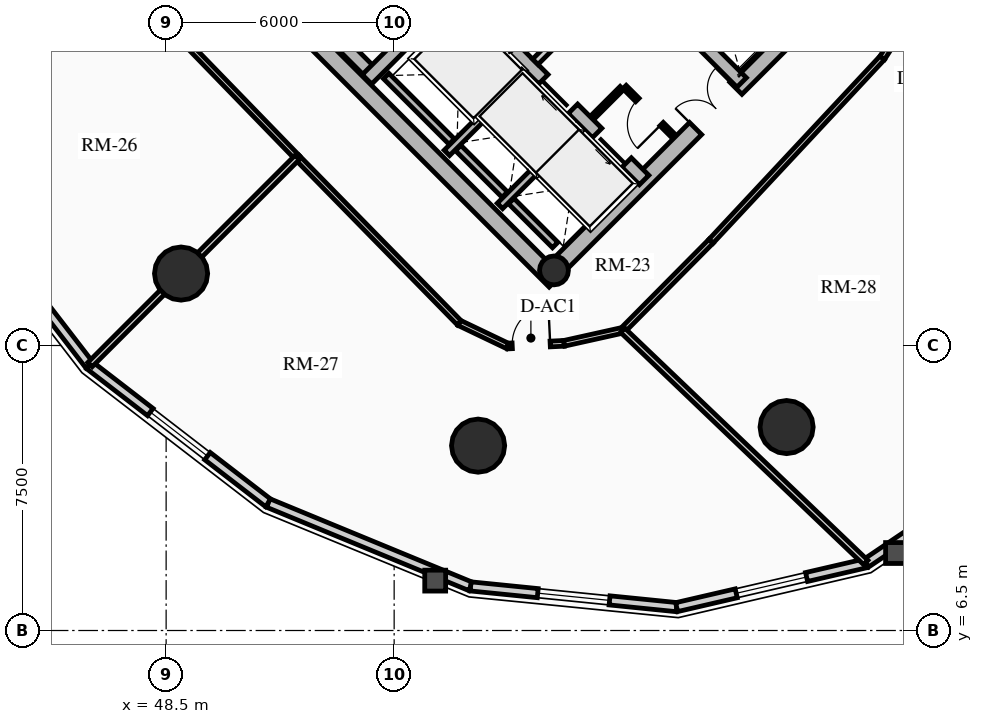
"""IFC4 building model, lengths in metres.
Left out: names, types, materials, properties, quantities, classifications, styles, units other than length and angle.
Written with IfcOpenShell. Run it as: python <this file> out.ifc"""

import sys

from ifc_helpers import new_model, si_unit, direction, frame, frame_2d, origin, origin_2d, place, context, subcontext, project, spatial, rectangle, circle, hollow_circle, extrude, source, transform, mapped, element, fill, save


model = new_model("IFC4")
c1 = context("Model", 3, precision=1e-05, world=origin(), true_north=direction((0.0, 1.0)))
c2 = subcontext(c1, "Body", "Model", "MODEL_VIEW")
j1 = project(units=[si_unit("LENGTHUNIT", "METRE"), si_unit("PLANEANGLEUNIT", "RADIAN")], contexts=[c1])
p1 = place(None, origin())
s1 = spatial("IfcSite", under=j1, at=p1, CompositionType="ELEMENT")
p2 = place(p1, origin())
s2 = spatial("IfcBuilding", under=s1, at=p2, CompositionType="ELEMENT")
p3 = place(p2, frame((0.0, 0.0, 136.6)))
s3 = spatial("IfcBuildingStorey", under=s2, at=p3, CompositionType="ELEMENT", Elevation=136.6)
p4 = place(p3, frame((58.737, 15.697, 0.0), z_axis=(0.0, 0.0, 1.0), x_axis=(-0.707106781187, 0.707106781187, 0.0)))
e1 = element("IfcWall", 1, at=p4, inside=s3, PredefinedType="SHEAR", context=c2, shape_type="SweptSolid", body=[
    extrude(rectangle(XDim=14.2, YDim=0.45, at=frame_2d((7.1, 0.0))), origin(), (0.0, 0.0, 1.0), 3.72),
])
p5 = place(p3, frame((58.578, 15.856, 0.0), z_axis=(0.0, 0.0, 1.0), x_axis=(0.707106781187, 0.707106781187, 0.0)))
e2 = element("IfcWall", 2, at=p5, inside=s3, PredefinedType="SHEAR", context=c2, shape_type="SweptSolid", body=[
    extrude(rectangle(XDim=10.7, YDim=0.45, at=frame_2d((5.35, 0.0))), origin(), (0.0, 0.0, 1.0), 3.72),
])
m1 = source(origin(), c2, "Body", "SweptSolid", [
    extrude(rectangle(XDim=1.5, YDim=2.02, at=frame_2d((0.75, 1.01))), frame((0.0, 0.235, 0.0), z_axis=(0.0, -1.0, 0.0), x_axis=(1.0, 0.0, 0.0)), (0.0, 0.0, 1.0), 0.47),
])
p6 = place(p5, frame((5.45, 0.0, 0.0)))
e3 = element("IfcOpeningElement", 3, at=p6, cuts=e2, PredefinedType="OPENING", context=c2, shape_type="MappedRepresentation", body=[
    mapped(m1, transform((0.0, 0.0, 0.0), x_axis=(1.0, 0.0, 0.0), y_axis=(0.0, 1.0, 0.0), z_axis=(0.0, 0.0, 1.0), scale=1.0)),
])
p7 = place(p3, frame((61.078, 18.355, 0.0), z_axis=(0.0, 0.0, 1.0), x_axis=(-0.707106781187, 0.707106781187, 0.0)))
e4 = element("IfcWall", 4, at=p7, inside=s3, PredefinedType="SHEAR", context=c2, shape_type="SweptSolid", body=[
    extrude(rectangle(XDim=13.75, YDim=0.35, at=frame_2d((6.875, 0.0))), origin(), (0.0, 0.0, 1.0), 3.72),
])
m2 = source(origin(), c2, "Body", "SweptSolid", [
    extrude(rectangle(XDim=1.1, YDim=2.015, at=frame_2d((0.55, 1.007))), frame((0.0, 0.185, 0.0), z_axis=(0.0, -1.0, 0.0), x_axis=(1.0, 0.0, 0.0)), (0.0, 0.0, 1.0), 0.37),
])
p8 = place(p7, frame((4.875, 0.0, 0.0)))
e5 = element("IfcOpeningElement", 5, at=p8, cuts=e4, PredefinedType="OPENING", context=c2, shape_type="MappedRepresentation", body=[
    mapped(m2, transform((0.0, 0.0, 0.0), x_axis=(1.0, 0.0, 0.0), y_axis=(0.0, 1.0, 0.0), z_axis=(0.0, 0.0, 1.0), scale=1.0)),
])
p9 = place(p7, frame((0.65, 0.0, 0.0)))
e6 = element("IfcOpeningElement", 6, at=p9, cuts=e4, PredefinedType="OPENING", context=c2, shape_type="MappedRepresentation", body=[
    mapped(m2, transform((0.0, 0.0, 0.0), x_axis=(1.0, 0.0, 0.0), y_axis=(0.0, 1.0, 0.0), z_axis=(0.0, 0.0, 1.0), scale=1.0)),
])
p10 = place(p7, frame((2.65, 0.0, 0.0)))
e7 = element("IfcOpeningElement", 7, at=p10, cuts=e4, PredefinedType="OPENING", context=c2, shape_type="MappedRepresentation", body=[
    mapped(m2, transform((0.0, 0.0, 0.0), x_axis=(1.0, 0.0, 0.0), y_axis=(0.0, 1.0, 0.0), z_axis=(0.0, 0.0, 1.0), scale=1.0)),
])
m3 = source(origin(), c2, "Body", "SweptSolid", [
    extrude(rectangle(XDim=1.15, YDim=2.02, at=frame_2d((0.575, 1.01))), frame((0.0, 0.185, 0.0), z_axis=(0.0, -1.0, 0.0), x_axis=(1.0, 0.0, 0.0)), (0.0, 0.0, 1.0), 0.37),
])
p11 = place(p7, frame((7.295, 0.0, 0.0)))
e8 = element("IfcOpeningElement", 8, at=p11, cuts=e4, PredefinedType="OPENING", context=c2, shape_type="MappedRepresentation", body=[
    mapped(m3, transform((0.0, 0.0, 0.0), x_axis=(1.0, 0.0, 0.0), y_axis=(0.0, 1.0, 0.0), z_axis=(0.0, 0.0, 1.0), scale=1.0)),
])
p12 = place(p3, frame((63.645, 20.922, 0.0), z_axis=(0.0, 0.0, 1.0), x_axis=(-0.70711946392, 0.707094098226, 0.0)))
e9 = element("IfcWall", 9, at=p12, inside=s3, PredefinedType="SHEAR", context=c2, shape_type="SweptSolid", body=[
    extrude(rectangle(XDim=9.625, YDim=0.35, at=frame_2d((4.812, 0.0))), origin(), (0.0, 0.0, 1.0), 3.72),
])
p13 = place(p12, frame((5.305, 0.0, 0.0)))
e10 = element("IfcOpeningElement", 10, at=p13, cuts=e9, PredefinedType="OPENING", context=c2, shape_type="MappedRepresentation", body=[
    mapped(m3, transform((0.0, 0.0, 0.0), x_axis=(1.0, 0.0, 0.0), y_axis=(0.0, 1.0, 0.0), z_axis=(0.0, 0.0, 1.0), scale=1.0)),
])
p14 = place(p3, frame((53.922, 21.141, 0.0), z_axis=(0.0, 0.0, 1.0), x_axis=(-0.707088616009, 0.707124945897, 0.0)))
e11 = element("IfcWall", 11, at=p14, inside=s3, PredefinedType="SHEAR", context=c2, shape_type="SweptSolid", body=[
    extrude(rectangle(XDim=6.72, YDim=0.35, at=frame_2d((3.36, 0.0))), origin(), (0.0, 0.0, 1.0), 3.72),
])
p15 = place(p3, frame((53.784, 21.003, 0.0), z_axis=(0.0, 0.0, 1.0), x_axis=(0.707106781187, 0.707106781187, 0.0)))
e12 = element("IfcWall", 12, at=p15, inside=s3, PredefinedType="SHEAR", context=c2, shape_type="SweptSolid", body=[
    extrude(rectangle(XDim=3.285, YDim=0.35, at=frame_2d((1.643, 0.0))), origin(), (0.0, 0.0, 1.0), 3.72),
])
p16 = place(p3, frame((58.706, 15.976, 0.0), z_axis=(0.0, 0.0, 1.0), x_axis=(0.707106781187, 0.707106781187, 0.0)))
e13 = element("IfcColumn", 13, at=p16, inside=s3, PredefinedType="COLUMN", context=c2, shape_type="SweptSolid", body=[
    extrude(hollow_circle(Radius=0.38, WallThickness=0.032, at=origin_2d()), origin(), (0.0, 0.0, 1.0), 3.72),
])
for number, where, z_axis, x_axis in (
    (14, (48.893, 15.893, 0.0), (0.0, 0.0, 1.0), (1.0, 0.0, 0.0)),
    (15, (56.709, 11.365, 0.0), (0.0, 0.0, 1.0), (1.0, 0.0, 0.0)),
    (16, (64.827, 11.854, 0.0), (0.0, 0.0, 1.0), (1.0, 0.0, 0.0)),
):
    element("IfcColumn", number, at=place(p3, frame(where, z_axis=z_axis, x_axis=x_axis)), inside=s3, PredefinedType="USERDEFINED", context=c2, shape_type="SweptSolid", body=[
        extrude(circle(Radius=0.7, at=origin_2d()), origin(), (0.0, 0.0, 1.0), 3.72),
    ])
p17 = place(p3, frame((46.483, 13.483, 0.0), z_axis=(0.0, 0.0, 1.0), x_axis=(-0.61054437102, 0.791982052206, 0.0)))
e17 = element("IfcWall", 17, at=p17, inside=s3, PredefinedType="SOLIDWALL", context=c2, shape_type="SweptSolid", body=[
    extrude(rectangle(XDim=5.942, YDim=0.24, at=frame_2d((2.971, 0.0))), origin(), (0.0, 0.0, 1.0), 2.949),
])
p18 = place(p3, frame((51.189, 9.855, 0.0), z_axis=(0.0, 0.0, 1.0), x_axis=(-0.791982052206, 0.61054437102, 0.0)))
e18 = element("IfcWall", 18, at=p18, inside=s3, PredefinedType="SOLIDWALL", context=c2, shape_type="SweptSolid", body=[
    extrude(rectangle(XDim=5.942, YDim=0.24, at=frame_2d((2.971, 0.0))), origin(), (0.0, 0.0, 1.0), 2.949),
])
m4 = source(origin(), c2, "Body", "SweptSolid", [
    extrude(rectangle(XDim=1.9, YDim=1.35, at=frame_2d((0.95, 0.675))), frame((0.0, 0.13, 0.0), z_axis=(0.0, -1.0, 0.0), x_axis=(1.0, 0.0, 0.0)), (0.0, 0.0, 1.0), 0.26),
])
p19 = place(p18, frame((2.021, 0.0, 0.65)))
e19 = element("IfcOpeningElement", 19, at=p19, cuts=e18, PredefinedType="OPENING", context=c2, shape_type="MappedRepresentation", body=[
    mapped(m4, transform((0.0, 0.0, 0.0), x_axis=(1.0, 0.0, 0.0), y_axis=(0.0, 1.0, 0.0), z_axis=(0.0, 0.0, 1.0), scale=1.0)),
])
p20 = place(p3, frame((56.513, 7.661, 0.0), z_axis=(0.0, 0.0, 1.0), x_axis=(-0.924563909604, 0.381027003055, 0.0)))
e20 = element("IfcWall", 20, at=p20, inside=s3, PredefinedType="SOLIDWALL", context=c2, shape_type="SweptSolid", body=[
    extrude(rectangle(XDim=5.758, YDim=0.24, at=frame_2d((2.879, 0.0))), origin(), (0.0, 0.0, 1.0), 2.949),
])
p21 = place(p3, frame((61.933, 7.115, 0.0), z_axis=(0.0, 0.0, 1.0), x_axis=(-0.994971754311, 0.10015591906, 0.0)))
e21 = element("IfcWall", 21, at=p21, inside=s3, PredefinedType="SOLIDWALL", context=c2, shape_type="SweptSolid", body=[
    extrude(rectangle(XDim=5.448, YDim=0.24, at=frame_2d((2.724, 0.0))), origin(), (0.0, 0.0, 1.0), 2.949),
])
p22 = place(p21, frame((1.774, 0.0, 0.65)))
e22 = element("IfcOpeningElement", 22, at=p22, cuts=e21, PredefinedType="OPENING", context=c2, shape_type="MappedRepresentation", body=[
    mapped(m4, transform((0.0, 0.0, 0.0), x_axis=(1.0, 0.0, 0.0), y_axis=(0.0, 1.0, 0.0), z_axis=(0.0, 0.0, 1.0), scale=1.0)),
])
p23 = place(p3, frame((66.92, 8.271, 0.0), z_axis=(0.0, 0.0, 1.0), x_axis=(-0.974165631126, -0.225834725257, 0.0)))
e23 = element("IfcWall", 23, at=p23, inside=s3, PredefinedType="SOLIDWALL", context=c2, shape_type="SweptSolid", body=[
    extrude(rectangle(XDim=5.119, YDim=0.24, at=frame_2d((2.56, 0.0))), origin(), (0.0, 0.0, 1.0), 2.949),
])
p24 = place(p23, frame((1.609, 0.0, 0.65)))
e24 = element("IfcOpeningElement", 24, at=p24, cuts=e23, PredefinedType="OPENING", context=c2, shape_type="MappedRepresentation", body=[
    mapped(m4, transform((0.0, 0.0, 0.0), x_axis=(1.0, 0.0, 0.0), y_axis=(0.0, 1.0, 0.0), z_axis=(0.0, 0.0, 1.0), scale=1.0)),
])
p25 = place(p3, frame((70.985, 11.015, 0.0), z_axis=(0.0, 0.0, 1.0), x_axis=(-0.828781148131, -0.559572880421, 0.0)))
e25 = element("IfcWall", 25, at=p25, inside=s3, PredefinedType="SOLIDWALL", context=c2, shape_type="SweptSolid", body=[
    extrude(rectangle(XDim=4.905, YDim=0.24, at=frame_2d((2.452, 0.0))), origin(), (0.0, 0.0, 1.0), 2.949),
])
p26 = place(p3, frame((55.888, 19.069, 0.0), z_axis=(0.0, 0.0, 1.0), x_axis=(0.707106781187, 0.707106781187, 0.0)))
e26 = element("IfcWall", 26, at=p26, inside=s3, PredefinedType="SHEAR", context=c2, shape_type="SweptSolid", body=[
    extrude(rectangle(XDim=2.97, YDim=0.2, at=frame_2d((1.485, 0.0))), origin(), (0.0, 0.0, 1.0), 3.72),
])
p27 = place(p3, frame((56.015, 19.366, 0.0), z_axis=(0.0, 0.0, 1.0), x_axis=(-0.707106781187, 0.707106781187, 0.0)))
e27 = element("IfcWall", 27, at=p27, inside=s3, PredefinedType="SHEAR", context=c2, shape_type="SweptSolid", body=[
    extrude(rectangle(XDim=2.44, YDim=0.2, at=frame_2d((1.22, 0.0))), origin(), (0.0, 0.0, 1.0), 3.72),
])
p28 = place(p3, frame((57.284, 17.673, 0.0), z_axis=(0.0, 0.0, 1.0), x_axis=(0.707147878904, 0.70706568108, 0.0)))
e28 = element("IfcWall", 28, at=p28, inside=s3, PredefinedType="SHEAR", context=c2, shape_type="SweptSolid", body=[
    extrude(rectangle(XDim=2.97, YDim=0.2, at=frame_2d((1.485, 0.0))), origin(), (0.0, 0.0, 1.0), 3.72),
])
p29 = place(p3, frame((57.412, 17.97, 0.0), z_axis=(0.0, 0.0, 1.0), x_axis=(-0.707106781187, 0.707106781187, 0.0)))
e29 = element("IfcWall", 29, at=p29, inside=s3, PredefinedType="SHEAR", context=c2, shape_type="SweptSolid", body=[
    extrude(rectangle(XDim=1.735, YDim=0.2, at=frame_2d((0.867, 0.0))), origin(), (0.0, 0.0, 1.0), 3.72),
])
p30 = place(p3, frame((58.737, 16.644, 0.0), z_axis=(0.0, 0.0, 1.0), x_axis=(-0.707032117043, 0.707181437447, 0.0)))
e30 = element("IfcWall", 30, at=p30, inside=s3, PredefinedType="SHEAR", context=c2, shape_type="SweptSolid", body=[
    extrude(rectangle(XDim=1.635, YDim=0.2, at=frame_2d((0.817, 0.0))), origin(), (0.0, 0.0, 1.0), 3.72),
])
p31 = place(p3, frame((58.214, 21.467, 0.0), z_axis=(0.0, 0.0, 1.0), x_axis=(0.707106781187, 0.707106781187, 0.0)))
e31 = element("IfcWall", 31, at=p31, inside=s3, PredefinedType="PARTITIONING", context=c2, shape_type="SweptSolid", body=[
    extrude(rectangle(XDim=3.28, YDim=0.2, at=frame_2d((1.64, 0.0))), origin(), (0.0, 0.0, 1.0), 3.425),
])
m5 = source(origin(), c2, "Body", "SweptSolid", [
    extrude(rectangle(XDim=1.5, YDim=2.02, at=frame_2d((0.75, 1.01))), frame((0.0, 0.11, 0.0), z_axis=(0.0, -1.0, 0.0), x_axis=(1.0, 0.0, 0.0)), (0.0, 0.0, 1.0), 0.22),
])
p32 = place(p31, frame((1.55, 0.0, 0.0)))
e32 = element("IfcOpeningElement", 32, at=p32, cuts=e31, PredefinedType="OPENING", context=c2, shape_type="MappedRepresentation", body=[
    mapped(m5, transform((0.0, 0.0, 0.0), x_axis=(1.0, 0.0, 0.0), y_axis=(0.0, 1.0, 0.0), z_axis=(0.0, 0.0, 1.0), scale=1.0)),
])
p33 = place(p3, frame((61.835, 19.529, 0.0), z_axis=(0.0, 0.0, 1.0), x_axis=(-0.707174592913, 0.707038962956, 0.0)))
e33 = element("IfcWall", 33, at=p33, inside=s3, PredefinedType="PARTITIONING", context=c2, shape_type="SweptSolid", body=[
    extrude(rectangle(XDim=1.8, YDim=0.125, at=frame_2d((0.9, 0.0))), origin(), (0.0, 0.0, 1.0), 3.425),
])
m6 = source(origin(), c2, "Body", "SweptSolid", [
    extrude(rectangle(XDim=0.9, YDim=2.005, at=frame_2d((0.45, 1.002))), frame((0.0, 0.073, 0.0), z_axis=(0.0, -1.0, 0.0), x_axis=(1.0, 0.0, 0.0)), (0.0, 0.0, 1.0), 0.145),
])
p34 = place(p33, frame((0.42, 0.0, 0.0)))
e34 = element("IfcOpeningElement", 34, at=p34, cuts=e33, PredefinedType="OPENING", context=c2, shape_type="MappedRepresentation", body=[
    mapped(m6, transform((0.0, 0.0, 0.0), x_axis=(1.0, 0.0, 0.0), y_axis=(0.0, 1.0, 0.0), z_axis=(0.0, 0.0, 1.0), scale=1.0)),
])
p35 = place(p3, frame((59.713, 19.996, 0.0), z_axis=(0.0, 0.0, 1.0), x_axis=(0.707217726, 0.706995818963, 0.0)))
e35 = element("IfcWall", 35, at=p35, inside=s3, PredefinedType="PARTITIONING", context=c2, shape_type="SweptSolid", body=[
    extrude(rectangle(XDim=1.1, YDim=0.125, at=frame_2d((0.55, 0.0))), origin(), (0.0, 0.0, 1.0), 3.425),
])
p36 = place(p3, frame((47.786, 23.242, 0.0), z_axis=(0.0, 0.0, 1.0), x_axis=(0.696183456981, -0.717863910659, 0.0)))
e36 = element("IfcWall", 36, at=p36, inside=s3, PredefinedType="PARTITIONING", context=c2, shape_type="SweptSolid", body=[
    extrude(rectangle(XDim=5.979, YDim=0.15, at=frame_2d((2.99, 0.0))), origin(), (0.0, 0.0, 1.0), 3.425),
])
p37 = place(p3, frame((51.949, 18.949, 0.0), z_axis=(0.0, 0.0, 1.0), x_axis=(0.699801520154, -0.714337337951, 0.0)))
e37 = element("IfcWall", 37, at=p37, inside=s3, PredefinedType="PARTITIONING", context=c2, shape_type="SweptSolid", body=[
    extrude(rectangle(XDim=6.097, YDim=0.15, at=frame_2d((3.048, 0.0))), origin(), (0.0, 0.0, 1.0), 2.995),
])
p38 = place(p3, frame((56.216, 14.594, 0.0), z_axis=(0.0, 0.0, 1.0), x_axis=(0.902219207281, -0.431277755064, 0.0)))
e38 = element("IfcWall", 38, at=p38, inside=s3, PredefinedType="PARTITIONING", context=c2, shape_type="SweptSolid", body=[
    extrude(rectangle(XDim=1.41, YDim=0.15, at=frame_2d((0.705, 0.0))), origin(), (0.0, 0.0, 1.0), 2.995),
])
p39 = place(p3, frame((57.488, 13.986, 0.0), z_axis=(0.0, 0.0, 1.0), x_axis=(0.998863298217, 0.047666670476, 0.0)))
e39 = element("IfcWall", 39, at=p39, inside=s3, PredefinedType="PARTITIONING", context=c2, shape_type="SweptSolid", body=[
    extrude(rectangle(XDim=1.485, YDim=0.15, at=frame_2d((0.743, 0.0))), origin(), (0.0, 0.0, 1.0), 2.995),
])
m7 = source(origin(), c2, "Body", "SweptSolid", [
    extrude(rectangle(XDim=1.0, YDim=2.015, at=frame_2d((0.5, 1.007))), frame((0.0, 0.085, 0.0), z_axis=(0.0, -1.0, 0.0), x_axis=(1.0, 0.0, 0.0)), (0.0, 0.0, 1.0), 0.17),
])
p40 = place(p39, frame((0.12, 0.0, 0.0)))
e40 = element("IfcOpeningElement", 40, at=p40, cuts=e39, PredefinedType="OPENING", context=c2, shape_type="MappedRepresentation", body=[
    mapped(m7, transform((0.0, 0.0, 0.0), x_axis=(1.0, 0.0, 0.0), y_axis=(0.0, 1.0, 0.0), z_axis=(0.0, 0.0, 1.0), scale=1.0)),
])
p41 = place(p3, frame((58.971, 14.057, 0.0), z_axis=(0.0, 0.0, 1.0), x_axis=(0.976085233804, 0.217388169756, 0.0)))
e41 = element("IfcWall", 41, at=p41, inside=s3, PredefinedType="PARTITIONING", context=c2, shape_type="SweptSolid", body=[
    extrude(rectangle(XDim=1.581, YDim=0.15, at=frame_2d((0.791, 0.0))), origin(), (0.0, 0.0, 1.0), 2.995),
])
p42 = place(p3, frame((60.515, 14.401, 0.0), z_axis=(0.0, 0.0, 1.0), x_axis=(0.704179607439, 0.710021887316, 0.0)))
e42 = element("IfcWall", 42, at=p42, inside=s3, PredefinedType="PARTITIONING", context=c2, shape_type="SweptSolid", body=[
    extrude(rectangle(XDim=3.301, YDim=0.15, at=frame_2d((1.651, 0.0))), origin(), (0.0, 0.0, 1.0), 2.995),
])
p43 = place(p3, frame((62.839, 16.745, 0.0), z_axis=(0.0, 0.0, 1.0), x_axis=(0.682386779427, 0.73099130177, 0.0)))
e43 = element("IfcWall", 43, at=p43, inside=s3, PredefinedType="PARTITIONING", context=c2, shape_type="SweptSolid", body=[
    extrude(rectangle(XDim=6.6, YDim=0.15, at=frame_2d((3.3, 0.0))), origin(), (0.0, 0.0, 1.0), 2.995),
])
p44 = place(p3, frame((67.343, 21.569, 0.0), z_axis=(0.0, 0.0, 1.0), x_axis=(0.542722446786, 0.83991210597, 0.0)))
e44 = element("IfcWall", 44, at=p44, inside=s3, PredefinedType="PARTITIONING", context=c2, shape_type="SweptSolid", body=[
    extrude(rectangle(XDim=1.876, YDim=0.15, at=frame_2d((0.938, 0.0))), origin(), (0.0, 0.0, 1.0), 2.995),
])
m8 = source(origin(), c2, "Body", "SweptSolid", [
    extrude(rectangle(XDim=1.05, YDim=2.015, at=frame_2d((0.525, 1.007))), frame((0.0, 0.085, 0.0), z_axis=(0.0, -1.0, 0.0), x_axis=(1.0, 0.0, 0.0)), (0.0, 0.0, 1.0), 0.17),
])
p45 = place(p44, frame((0.413, 0.0, 0.0)))
e45 = element("IfcOpeningElement", 45, at=p45, cuts=e44, PredefinedType="OPENING", context=c2, shape_type="MappedRepresentation", body=[
    mapped(m8, transform((0.0, 0.0, 0.0), x_axis=(1.0, 0.0, 0.0), y_axis=(0.0, 1.0, 0.0), z_axis=(0.0, 0.0, 1.0), scale=1.0)),
])
p46 = place(p3, frame((51.949, 18.949, 0.0), z_axis=(0.0, 0.0, 1.0), x_axis=(-0.707106781187, -0.707106781187, 0.0)))
e46 = element("IfcWall", 46, at=p46, inside=s3, PredefinedType="PARTITIONING", context=c2, shape_type="SweptSolid", body=[
    extrude(rectangle(XDim=7.711, YDim=0.16, at=frame_2d((3.855, 0.0))), origin(), (0.0, 0.0, 1.0), 2.512),
])
p47 = place(p3, frame((60.515, 14.401, 0.0), z_axis=(0.0, 0.0, 1.0), x_axis=(0.722998961483, -0.690849116446, 0.0)))
e47 = element("IfcWall", 47, at=p47, inside=s3, PredefinedType="PARTITIONING", context=c2, shape_type="SweptSolid", body=[
    extrude(rectangle(XDim=8.847, YDim=0.16, at=frame_2d((4.423, 0.0))), origin(), (0.0, 0.0, 1.0), 2.949),
])
m9 = source(origin(), c2, "Body", "SweptSolid", [
    extrude(rectangle(XDim=1.9, YDim=1.35, at=frame_2d((0.95, 0.675))), frame((0.0, 0.03, 0.0), z_axis=(0.0, -1.0, 0.0), x_axis=(1.0, 0.0, 0.0)), (0.0, 0.0, 1.0), 0.06),
])
p48 = place(p19, origin())
e48 = element("IfcWindow", 48, at=p48, inside=s3, PartitioningType="DOUBLE_PANEL_VERTICAL", PredefinedType="WINDOW", context=c2, shape_type="MappedRepresentation", body=[
    mapped(m9, transform((0.0, 0.0, 0.0), x_axis=(1.0, 0.0, 0.0), y_axis=(0.0, 1.0, 0.0), z_axis=(0.0, 0.0, 1.0), scale=1.0)),
])
fill(e19, e48)
p49 = place(p22, origin())
e49 = element("IfcWindow", 49, at=p49, inside=s3, PartitioningType="DOUBLE_PANEL_VERTICAL", PredefinedType="WINDOW", context=c2, shape_type="MappedRepresentation", body=[
    mapped(m9, transform((0.0, 0.0, 0.0), x_axis=(1.0, 0.0, 0.0), y_axis=(0.0, 1.0, 0.0), z_axis=(0.0, 0.0, 1.0), scale=1.0)),
])
fill(e22, e49)
p50 = place(p24, origin())
e50 = element("IfcWindow", 50, at=p50, inside=s3, PartitioningType="DOUBLE_PANEL_VERTICAL", PredefinedType="WINDOW", context=c2, shape_type="MappedRepresentation", body=[
    mapped(m9, transform((0.0, 0.0, 0.0), x_axis=(1.0, 0.0, 0.0), y_axis=(0.0, 1.0, 0.0), z_axis=(0.0, 0.0, 1.0), scale=1.0)),
])
fill(e24, e50)
m10 = source(origin(), c2, "Body", "SweptSolid", [
    extrude(rectangle(XDim=1.1, YDim=2.015, at=frame_2d((0.55, 1.007))), frame((0.0, 0.025, 0.0), z_axis=(0.0, -1.0, 0.0), x_axis=(1.0, 0.0, 0.0)), (0.0, 0.0, 1.0), 0.05),
])
p51 = place(p9, origin())
e51 = element("IfcDoor", 51, at=p51, inside=s3, OperationType="SLIDING_TO_LEFT", PredefinedType="DOOR", context=c2, shape_type="MappedRepresentation", body=[
    mapped(m10, transform((0.0, 0.0, 0.0), x_axis=(1.0, 0.0, 0.0), y_axis=(0.0, 1.0, 0.0), z_axis=(0.0, 0.0, 1.0), scale=1.0)),
])
fill(e6, e51)
p52 = place(p10, origin())
e52 = element("IfcDoor", 52, at=p52, inside=s3, OperationType="SLIDING_TO_RIGHT", PredefinedType="DOOR", context=c2, shape_type="MappedRepresentation", body=[
    mapped(m10, transform((0.0, 0.0, 0.0), x_axis=(1.0, 0.0, 0.0), y_axis=(0.0, 1.0, 0.0), z_axis=(0.0, 0.0, 1.0), scale=1.0)),
])
fill(e7, e52)
m11 = source(origin(), c2, "Body", "SweptSolid", [
    extrude(rectangle(XDim=1.5, YDim=2.02, at=frame_2d((0.75, 1.01))), frame((0.0, 0.025, 0.0), z_axis=(0.0, -1.0, 0.0), x_axis=(1.0, 0.0, 0.0)), (0.0, 0.0, 1.0), 0.05),
])
p53 = place(p6, origin())
e53 = element("IfcDoor", 53, at=p53, inside=s3, OperationType="DOUBLE_DOOR_SINGLE_SWING", PredefinedType="DOOR", context=c2, shape_type="MappedRepresentation", body=[
    mapped(m11, transform((0.0, 0.0, 0.0), x_axis=(1.0, 0.0, 0.0), y_axis=(0.0, 1.0, 0.0), z_axis=(0.0, 0.0, 1.0), scale=1.0)),
])
fill(e3, e53)
m12 = source(origin(), c2, "Body", "SweptSolid", [
    extrude(rectangle(XDim=0.9, YDim=2.005, at=frame_2d((0.45, 1.002))), frame((0.0, 0.025, 0.0), z_axis=(0.0, -1.0, 0.0), x_axis=(1.0, 0.0, 0.0)), (0.0, 0.0, 1.0), 0.05),
])
p54 = place(p34, origin())
e54 = element("IfcDoor", 54, at=p54, inside=s3, OperationType="SINGLE_SWING_LEFT", PredefinedType="DOOR", context=c2, shape_type="MappedRepresentation", body=[
    mapped(m12, transform((0.0, 0.0, 0.0), x_axis=(1.0, 0.0, 0.0), y_axis=(0.0, 1.0, 0.0), z_axis=(0.0, 0.0, 1.0), scale=1.0)),
])
fill(e34, e54)
m13 = source(origin(), c2, "Body", "SweptSolid", [
    extrude(rectangle(XDim=1.0, YDim=2.015, at=frame_2d((0.5, 1.007))), frame((0.0, 0.025, 0.0), z_axis=(0.0, -1.0, 0.0), x_axis=(1.0, 0.0, 0.0)), (0.0, 0.0, 1.0), 0.05),
])
p55 = place(p40, origin())
e55 = element("IfcDoor", 55, at=p55, inside=s3, OperationType="SINGLE_SWING_RIGHT", PredefinedType="DOOR", context=c2, shape_type="MappedRepresentation", body=[
    mapped(m13, transform((0.0, 0.0, 0.0), x_axis=(1.0, 0.0, 0.0), y_axis=(0.0, 1.0, 0.0), z_axis=(0.0, 0.0, 1.0), scale=1.0)),
])
fill(e40, e55)
save(model, sys.argv[1])
